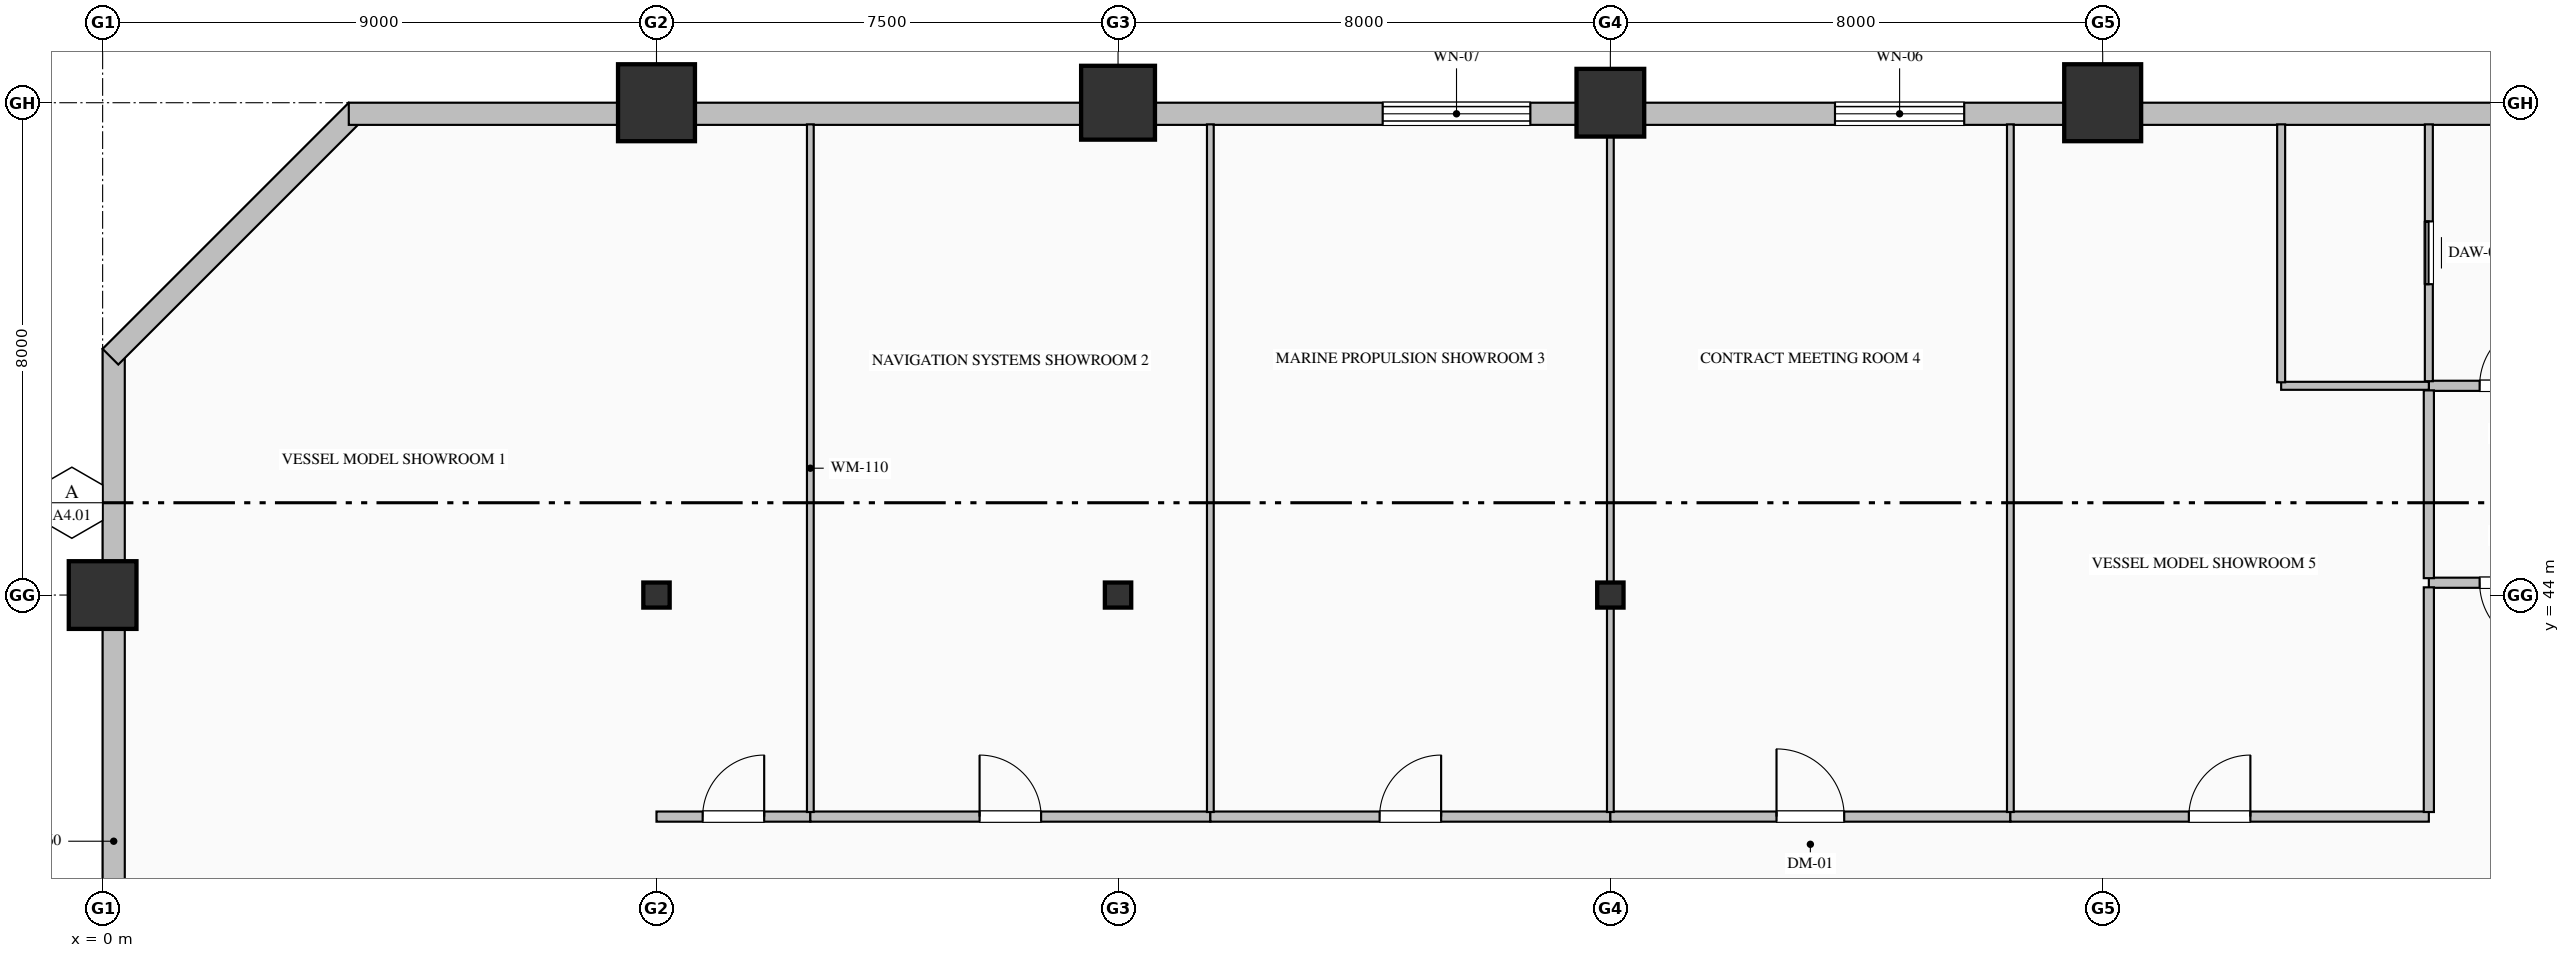
"""IFC4 building model, lengths in metres.
Left out: names, types, materials, properties, quantities, classifications, styles, units other than length and angle.
Written with IfcOpenShell. Run it as: python <this file> out.ifc"""

import sys

from ifc_helpers import new_model, si_unit, direction, frame, frame_2d, origin, origin_2d, place, context, subcontext, project, spatial, rectangle, hollow_rectangle, hollow_circle, i_section, extrude, element, fill, save


model = new_model("IFC4")
c1 = context("Model", 3, precision=1e-05, world=origin(), true_north=direction((0.0, 1.0)))
c2 = subcontext(c1, "Body", "Model", "MODEL_VIEW")
j1 = project(units=[si_unit("LENGTHUNIT", "METRE"), si_unit("PLANEANGLEUNIT", "RADIAN")], contexts=[c1])
p1 = place(None, origin())
s1 = spatial("IfcSite", under=j1, at=p1, CompositionType="ELEMENT")
p2 = place(p1, origin())
s2 = spatial("IfcBuilding", under=s1, at=p2, CompositionType="ELEMENT")
p3 = place(p2, frame((0.0, 0.0, 96.2)))
s3 = spatial("IfcBuildingStorey", under=s2, at=p3, CompositionType="ELEMENT", Elevation=96.2)
p4 = place(p3, frame((0.0, 44.0, 0.0), z_axis=(0.0, 0.0, 1.0), x_axis=(1.0, 0.0, 0.0)))
e1 = element("IfcColumn", 1, at=p4, inside=s3, PredefinedType="COLUMN", context=c2, shape_type="SweptSolid", body=[
    extrude(hollow_rectangle(XDim=1.1, YDim=1.1, WallThickness=0.04, at=origin_2d()), origin(), (0.0, 0.0, 1.0), 4.0),
])
p5 = place(p3, frame((9.0, 44.0, 0.0), z_axis=(0.0, 0.0, 1.0), x_axis=(1.0, 0.0, 0.0)))
e2 = element("IfcColumn", 2, at=p5, inside=s3, PredefinedType="COLUMN", context=c2, shape_type="SweptSolid", body=[
    extrude(i_section(OverallWidth=0.407, OverallDepth=0.428, WebThickness=0.02, FlangeThickness=0.035, FilletRadius=0.022, at=origin_2d()), origin(), (0.0, 0.0, 1.0), 4.0),
])
p6 = place(p3, frame((9.0, 52.0, 0.0), z_axis=(0.0, 0.0, 1.0), x_axis=(1.0, 0.0, 0.0)))
e3 = element("IfcColumn", 3, at=p6, inside=s3, PredefinedType="COLUMN", context=c2, shape_type="SweptSolid", body=[
    extrude(hollow_rectangle(XDim=1.25, YDim=1.25, WallThickness=0.045, at=origin_2d()), origin(), (0.0, 0.0, 1.0), 4.0),
])
p7 = place(p3, frame((16.5, 44.0, 0.0), z_axis=(0.0, 0.0, 1.0), x_axis=(1.0, 0.0, 0.0)))
e4 = element("IfcColumn", 4, at=p7, inside=s3, PredefinedType="COLUMN", context=c2, shape_type="SweptSolid", body=[
    extrude(i_section(OverallWidth=0.407, OverallDepth=0.428, WebThickness=0.02, FlangeThickness=0.035, FilletRadius=0.022, at=origin_2d()), origin(), (0.0, 0.0, 1.0), 4.0),
])
p8 = place(p3, frame((16.5, 52.0, 0.0), z_axis=(0.0, 0.0, 1.0), x_axis=(1.0, 0.0, 0.0)))
e5 = element("IfcColumn", 5, at=p8, inside=s3, PredefinedType="COLUMN", context=c2, shape_type="SweptSolid", body=[
    extrude(hollow_circle(Radius=0.6, WallThickness=0.04, at=origin_2d()), origin(), (0.0, 0.0, 1.0), 4.0),
])
p9 = place(p3, frame((24.5, 44.0, 0.0), z_axis=(0.0, 0.0, 1.0), x_axis=(1.0, 0.0, 0.0)))
e6 = element("IfcColumn", 6, at=p9, inside=s3, PredefinedType="COLUMN", context=c2, shape_type="SweptSolid", body=[
    extrude(i_section(OverallWidth=0.407, OverallDepth=0.428, WebThickness=0.02, FlangeThickness=0.035, FilletRadius=0.022, at=origin_2d()), origin(), (0.0, 0.0, 1.0), 4.0),
])
p10 = place(p3, frame((24.5, 52.0, 0.0), z_axis=(0.0, 0.0, 1.0), x_axis=(1.0, 0.0, 0.0)))
e7 = element("IfcColumn", 7, at=p10, inside=s3, PredefinedType="COLUMN", context=c2, shape_type="SweptSolid", body=[
    extrude(hollow_rectangle(XDim=1.1, YDim=1.1, WallThickness=0.04, at=origin_2d()), origin(), (0.0, 0.0, 1.0), 4.0),
])
p11 = place(p3, frame((32.5, 52.0, 0.0), z_axis=(0.0, 0.0, 1.0), x_axis=(1.0, 0.0, 0.0)))
e8 = element("IfcColumn", 8, at=p11, inside=s3, PredefinedType="COLUMN", context=c2, shape_type="SweptSolid", body=[
    extrude(hollow_rectangle(XDim=1.25, YDim=1.25, WallThickness=0.045, at=origin_2d()), origin(), (0.0, 0.0, 1.0), 4.0),
])
p12 = place(p3, frame((0.18, 32.0, 0.0), z_axis=(0.0, 0.0, 1.0), x_axis=(0.0, 1.0, 0.0)))
e9 = element("IfcWall", 9, at=p12, inside=s3, PredefinedType="SOLIDWALL", context=c2, shape_type="SweptSolid", body=[
    extrude(rectangle(XDim=16.0, YDim=0.36, at=frame_2d((8.0, 0.0))), origin(), (0.0, 0.0, 1.0), 3.25),
])
p13 = place(p3, frame((0.127, 47.873, 0.0), z_axis=(0.0, 0.0, 1.0), x_axis=(0.707106781187, 0.707106781187, 0.0)))
e10 = element("IfcWall", 10, at=p13, inside=s3, PredefinedType="SOLIDWALL", context=c2, shape_type="SweptSolid", body=[
    extrude(rectangle(XDim=5.657, YDim=0.36, at=frame_2d((2.828, 0.0))), origin(), (0.0, 0.0, 1.0), 3.75),
])
p14 = place(p3, frame((4.0, 51.82, 0.0), z_axis=(0.0, 0.0, 1.0), x_axis=(1.0, 0.0, 0.0)))
e11 = element("IfcWall", 11, at=p14, inside=s3, PredefinedType="SOLIDWALL", context=c2, shape_type="SweptSolid", body=[
    extrude(rectangle(XDim=36.52, YDim=0.36, at=frame_2d((18.26, 0.0))), origin(), (0.0, 0.0, 1.0), 3.25),
])
p15 = place(p14, frame((16.8, 0.0, 0.8)))
e12 = element("IfcOpeningElement", 12, at=p15, cuts=e11, PredefinedType="OPENING", context=c2, shape_type="SweptSolid", body=[
    extrude(rectangle(XDim=2.4, YDim=2.15, at=frame_2d((1.2, 1.075))), frame((0.0, 0.19, 0.0), z_axis=(0.0, -1.0, 0.0), x_axis=(1.0, 0.0, 0.0)), (0.0, 0.0, 1.0), 0.38),
])
p16 = place(p14, frame((24.15, 0.0, 0.85)))
e13 = element("IfcOpeningElement", 13, at=p16, cuts=e11, PredefinedType="OPENING", context=c2, shape_type="SweptSolid", body=[
    extrude(rectangle(XDim=2.1, YDim=2.05, at=frame_2d((1.05, 1.025))), frame((0.0, 0.19, 0.0), z_axis=(0.0, -1.0, 0.0), x_axis=(1.0, 0.0, 0.0)), (0.0, 0.0, 1.0), 0.38),
])
p17 = place(p3, frame((37.8, 47.4, 0.0), z_axis=(0.0, 0.0, 1.0), x_axis=(1.0, 0.0, 0.0)))
e14 = element("IfcWall", 14, at=p17, inside=s3, PredefinedType="PARTITIONING", context=c2, shape_type="SweptSolid", body=[
    extrude(rectangle(XDim=2.7, YDim=0.165, at=frame_2d((1.35, 0.0))), origin(), (0.0, 0.0, 1.0), 3.75),
])
p18 = place(p17, frame((0.825, 0.0, 0.0)))
e15 = element("IfcOpeningElement", 15, at=p18, cuts=e14, PredefinedType="OPENING", context=c2, shape_type="SweptSolid", body=[
    extrude(rectangle(XDim=1.05, YDim=2.15, at=frame_2d((0.525, 1.075))), frame((0.0, 0.093, 0.0), z_axis=(0.0, -1.0, 0.0), x_axis=(1.0, 0.0, 0.0)), (0.0, 0.0, 1.0), 0.185),
])
p19 = place(p3, frame((40.5, 44.2, 0.0), z_axis=(0.0, 0.0, 1.0), x_axis=(-1.0, 0.0, 0.0)))
e16 = element("IfcWall", 16, at=p19, inside=s3, PredefinedType="PARTITIONING", context=c2, shape_type="SweptSolid", body=[
    extrude(rectangle(XDim=2.7, YDim=0.165, at=frame_2d((1.35, 0.0))), origin(), (0.0, 0.0, 1.0), 3.75),
])
p20 = place(p19, frame((0.825, 0.0, 0.0)))
e17 = element("IfcOpeningElement", 17, at=p20, cuts=e16, PredefinedType="OPENING", context=c2, shape_type="SweptSolid", body=[
    extrude(rectangle(XDim=1.05, YDim=2.15, at=frame_2d((0.525, 1.075))), frame((0.0, 0.093, 0.0), z_axis=(0.0, -1.0, 0.0), x_axis=(1.0, 0.0, 0.0)), (0.0, 0.0, 1.0), 0.185),
])
p21 = place(p3, frame((37.8, 44.274, 0.0), z_axis=(0.0, 0.0, 1.0), x_axis=(0.0, 1.0, 0.0)))
e18 = element("IfcWall", 18, at=p21, inside=s3, PredefinedType="PARTITIONING", context=c2, shape_type="SweptSolid", body=[
    extrude(rectangle(XDim=3.051, YDim=0.165, at=frame_2d((1.525, 0.0))), origin(), (0.0, 0.0, 1.0), 3.75),
])
p22 = place(p3, frame((37.8, 47.475, 0.0), z_axis=(0.0, 0.0, 1.0), x_axis=(0.0, 1.0, 0.0)))
e19 = element("IfcWall", 19, at=p22, inside=s3, PredefinedType="PARTITIONING", context=c2, shape_type="SweptSolid", body=[
    extrude(rectangle(XDim=4.173, YDim=0.13, at=frame_2d((2.087, 0.0))), origin(), (0.0, 0.0, 1.0), 3.75),
])
p23 = place(p22, frame((1.577, 0.0, 0.0)))
e20 = element("IfcOpeningElement", 20, at=p23, cuts=e19, PredefinedType="OPENING", context=c2, shape_type="SweptSolid", body=[
    extrude(rectangle(XDim=1.02, YDim=2.15, at=frame_2d((0.51, 1.075))), frame((0.0, 0.075, 0.0), z_axis=(0.0, -1.0, 0.0), x_axis=(1.0, 0.0, 0.0)), (0.0, 0.0, 1.0), 0.15),
])
p24 = place(p3, frame((37.8, 47.4, 0.0), z_axis=(0.0, 0.0, 1.0), x_axis=(-1.0, 0.0, 0.0)))
e21 = element("IfcWall", 21, at=p24, inside=s3, PredefinedType="PARTITIONING", context=c2, shape_type="SweptSolid", body=[
    extrude(rectangle(XDim=2.4, YDim=0.13, at=frame_2d((1.2, 0.0))), origin(), (0.0, 0.0, 1.0), 3.75),
])
p25 = place(p3, frame((35.4, 47.457, 0.0), z_axis=(0.0, 0.0, 1.0), x_axis=(0.0, 1.0, 0.0)))
e22 = element("IfcWall", 22, at=p25, inside=s3, PredefinedType="PARTITIONING", context=c2, shape_type="SweptSolid", body=[
    extrude(rectangle(XDim=4.191, YDim=0.13, at=frame_2d((2.095, 0.0))), origin(), (0.0, 0.0, 1.0), 3.75),
])
p26 = place(p3, frame((9.0, 40.4, 0.0), z_axis=(0.0, 0.0, 1.0), x_axis=(1.0, 0.0, 0.0)))
e23 = element("IfcWall", 23, at=p26, inside=s3, PredefinedType="PARTITIONING", context=c2, shape_type="SweptSolid", body=[
    extrude(rectangle(XDim=2.5, YDim=0.165, at=frame_2d((1.25, 0.0))), origin(), (0.0, 0.0, 1.0), 3.75),
])
p27 = place(p26, frame((0.75, 0.0, 0.0)))
e24 = element("IfcOpeningElement", 24, at=p27, cuts=e23, PredefinedType="OPENING", context=c2, shape_type="SweptSolid", body=[
    extrude(rectangle(XDim=1.0, YDim=2.15, at=frame_2d((0.5, 1.075))), frame((0.0, 0.093, 0.0), z_axis=(0.0, -1.0, 0.0), x_axis=(1.0, 0.0, 0.0)), (0.0, 0.0, 1.0), 0.185),
])
p28 = place(p3, frame((11.5, 40.4, 0.0), z_axis=(0.0, 0.0, 1.0), x_axis=(1.0, 0.0, 0.0)))
e25 = element("IfcWall", 25, at=p28, inside=s3, PredefinedType="PARTITIONING", context=c2, shape_type="SweptSolid", body=[
    extrude(rectangle(XDim=6.5, YDim=0.165, at=frame_2d((3.25, 0.0))), origin(), (0.0, 0.0, 1.0), 3.75),
])
p29 = place(p28, frame((2.75, 0.0, 0.0)))
e26 = element("IfcOpeningElement", 26, at=p29, cuts=e25, PredefinedType="OPENING", context=c2, shape_type="SweptSolid", body=[
    extrude(rectangle(XDim=1.0, YDim=2.15, at=frame_2d((0.5, 1.075))), frame((0.0, 0.093, 0.0), z_axis=(0.0, -1.0, 0.0), x_axis=(1.0, 0.0, 0.0)), (0.0, 0.0, 1.0), 0.185),
])
p30 = place(p3, frame((18.0, 40.4, 0.0), z_axis=(0.0, 0.0, 1.0), x_axis=(1.0, 0.0, 0.0)))
e27 = element("IfcWall", 27, at=p30, inside=s3, PredefinedType="PARTITIONING", context=c2, shape_type="SweptSolid", body=[
    extrude(rectangle(XDim=6.5, YDim=0.165, at=frame_2d((3.25, 0.0))), origin(), (0.0, 0.0, 1.0), 3.75),
])
p31 = place(p30, frame((2.75, 0.0, 0.0)))
e28 = element("IfcOpeningElement", 28, at=p31, cuts=e27, PredefinedType="OPENING", context=c2, shape_type="SweptSolid", body=[
    extrude(rectangle(XDim=1.0, YDim=2.15, at=frame_2d((0.5, 1.075))), frame((0.0, 0.093, 0.0), z_axis=(0.0, -1.0, 0.0), x_axis=(1.0, 0.0, 0.0)), (0.0, 0.0, 1.0), 0.185),
])
p32 = place(p3, frame((24.5, 40.4, 0.0), z_axis=(0.0, 0.0, 1.0), x_axis=(1.0, 0.0, 0.0)))
e29 = element("IfcWall", 29, at=p32, inside=s3, PredefinedType="PARTITIONING", context=c2, shape_type="SweptSolid", body=[
    extrude(rectangle(XDim=6.5, YDim=0.165, at=frame_2d((3.25, 0.0))), origin(), (0.0, 0.0, 1.0), 3.75),
])
p33 = place(p32, frame((2.7, 0.0, 0.0)))
e30 = element("IfcOpeningElement", 30, at=p33, cuts=e29, PredefinedType="OPENING", context=c2, shape_type="SweptSolid", body=[
    extrude(rectangle(XDim=1.1, YDim=2.2, at=frame_2d((0.55, 1.1))), frame((0.0, 0.093, 0.0), z_axis=(0.0, -1.0, 0.0), x_axis=(1.0, 0.0, 0.0)), (0.0, 0.0, 1.0), 0.185),
])
p34 = place(p3, frame((31.0, 40.4, 0.0), z_axis=(0.0, 0.0, 1.0), x_axis=(1.0, 0.0, 0.0)))
e31 = element("IfcWall", 31, at=p34, inside=s3, PredefinedType="PARTITIONING", context=c2, shape_type="SweptSolid", body=[
    extrude(rectangle(XDim=6.8, YDim=0.165, at=frame_2d((3.4, 0.0))), origin(), (0.0, 0.0, 1.0), 3.75),
])
p35 = place(p34, frame((2.9, 0.0, 0.0)))
e32 = element("IfcOpeningElement", 32, at=p35, cuts=e31, PredefinedType="OPENING", context=c2, shape_type="SweptSolid", body=[
    extrude(rectangle(XDim=1.0, YDim=2.15, at=frame_2d((0.5, 1.075))), frame((0.0, 0.093, 0.0), z_axis=(0.0, -1.0, 0.0), x_axis=(1.0, 0.0, 0.0)), (0.0, 0.0, 1.0), 0.185),
])
p36 = place(p3, frame((37.8, 40.475, 0.0), z_axis=(0.0, 0.0, 1.0), x_axis=(0.0, 1.0, 0.0)))
e33 = element("IfcWall", 33, at=p36, inside=s3, PredefinedType="PARTITIONING", context=c2, shape_type="SweptSolid", body=[
    extrude(rectangle(XDim=3.651, YDim=0.165, at=frame_2d((1.825, 0.0))), origin(), (0.0, 0.0, 1.0), 3.75),
])
for number, where, z_axis, x_axis in (
    (34, (11.5, 51.648, 0.0), (0.0, 0.0, 1.0), (0.0, -1.0, 0.0)),
    (35, (18.0, 51.648, 0.0), (0.0, 0.0, 1.0), (0.0, -1.0, 0.0)),
):
    element("IfcWall", number, at=place(p3, frame(where, z_axis=z_axis, x_axis=x_axis)), inside=s3, PredefinedType="MOVABLE", context=c2, shape_type="SweptSolid", body=[
        extrude(rectangle(XDim=11.173, YDim=0.11, at=frame_2d((5.587, 0.0))), origin(), (0.0, 0.0, 1.0), 3.75),
    ])
p37 = place(p3, frame((24.5, 51.648, 0.0), z_axis=(0.0, 0.0, 1.0), x_axis=(0.0, -1.0, 0.0)))
e36 = element("IfcWall", 36, at=p37, inside=s3, PredefinedType="MOVABLE", context=c2, shape_type="SweptSolid", body=[
    extrude(rectangle(XDim=11.173, YDim=0.11, at=frame_2d((5.587, 0.0))), origin(), (0.0, 0.0, 1.0), 3.042),
])
p38 = place(p3, frame((31.0, 51.648, 0.0), z_axis=(0.0, 0.0, 1.0), x_axis=(0.0, -1.0, 0.0)))
e37 = element("IfcWall", 37, at=p38, inside=s3, PredefinedType="MOVABLE", context=c2, shape_type="SweptSolid", body=[
    extrude(rectangle(XDim=11.173, YDim=0.11, at=frame_2d((5.587, 0.0))), origin(), (0.0, 0.0, 1.0), 3.75),
])
p39 = place(p15, origin())
e38 = element("IfcWindow", 38, at=p39, inside=s3, PartitioningType="TRIPLE_PANEL_VERTICAL", PredefinedType="WINDOW", context=c2, shape_type="SweptSolid", body=[
    extrude(rectangle(XDim=2.4, YDim=2.15, at=frame_2d((1.2, 1.075))), frame((0.0, 0.15, 0.0), z_axis=(0.0, -1.0, 0.0), x_axis=(1.0, 0.0, 0.0)), (0.0, 0.0, 1.0), 0.06),
])
fill(e12, e38)
p40 = place(p16, origin())
e39 = element("IfcWindow", 39, at=p40, inside=s3, PartitioningType="TRIPLE_PANEL_VERTICAL", PredefinedType="WINDOW", context=c2, shape_type="SweptSolid", body=[
    extrude(rectangle(XDim=2.1, YDim=2.05, at=frame_2d((1.05, 1.025))), frame((0.0, 0.15, 0.0), z_axis=(0.0, -1.0, 0.0), x_axis=(1.0, 0.0, 0.0)), (0.0, 0.0, 1.0), 0.06),
])
fill(e13, e39)
p41 = place(p18, origin())
e40 = element("IfcDoor", 40, at=p41, inside=s3, OperationType="SINGLE_SWING_RIGHT", PredefinedType="DOOR", context=c2, shape_type="SweptSolid", body=[
    extrude(rectangle(XDim=1.05, YDim=2.15, at=frame_2d((0.525, 1.075))), frame((0.0, 0.025, 0.0), z_axis=(0.0, -1.0, 0.0), x_axis=(1.0, 0.0, 0.0)), (0.0, 0.0, 1.0), 0.05),
])
fill(e15, e40)
p42 = place(p20, origin())
e41 = element("IfcDoor", 41, at=p42, inside=s3, OperationType="SINGLE_SWING_LEFT", PredefinedType="DOOR", context=c2, shape_type="SweptSolid", body=[
    extrude(rectangle(XDim=1.05, YDim=2.15, at=frame_2d((0.525, 1.075))), frame((0.0, 0.025, 0.0), z_axis=(0.0, -1.0, 0.0), x_axis=(1.0, 0.0, 0.0)), (0.0, 0.0, 1.0), 0.05),
])
fill(e17, e41)
p43 = place(p23, origin())
e42 = element("IfcDoor", 42, at=p43, inside=s3, OperationType="SLIDING_TO_LEFT", PredefinedType="DOOR", context=c2, shape_type="SweptSolid", body=[
    extrude(rectangle(XDim=1.02, YDim=2.15, at=frame_2d((0.51, 1.075))), frame((0.0, 0.025, 0.0), z_axis=(0.0, -1.0, 0.0), x_axis=(1.0, 0.0, 0.0)), (0.0, 0.0, 1.0), 0.05),
])
fill(e20, e42)
p44 = place(p27, origin())
e43 = element("IfcDoor", 43, at=p44, inside=s3, OperationType="SINGLE_SWING_RIGHT", PredefinedType="DOOR", context=c2, shape_type="SweptSolid", body=[
    extrude(rectangle(XDim=1.0, YDim=2.15, at=frame_2d((0.5, 1.075))), frame((0.0, 0.025, 0.0), z_axis=(0.0, -1.0, 0.0), x_axis=(1.0, 0.0, 0.0)), (0.0, 0.0, 1.0), 0.05),
])
fill(e24, e43)
p45 = place(p29, origin())
e44 = element("IfcDoor", 44, at=p45, inside=s3, OperationType="SINGLE_SWING_LEFT", PredefinedType="DOOR", context=c2, shape_type="SweptSolid", body=[
    extrude(rectangle(XDim=1.0, YDim=2.15, at=frame_2d((0.5, 1.075))), frame((0.0, 0.025, 0.0), z_axis=(0.0, -1.0, 0.0), x_axis=(1.0, 0.0, 0.0)), (0.0, 0.0, 1.0), 0.05),
])
fill(e26, e44)
p46 = place(p31, origin())
e45 = element("IfcDoor", 45, at=p46, inside=s3, OperationType="SINGLE_SWING_RIGHT", PredefinedType="DOOR", context=c2, shape_type="SweptSolid", body=[
    extrude(rectangle(XDim=1.0, YDim=2.15, at=frame_2d((0.5, 1.075))), frame((0.0, 0.025, 0.0), z_axis=(0.0, -1.0, 0.0), x_axis=(1.0, 0.0, 0.0)), (0.0, 0.0, 1.0), 0.05),
])
fill(e28, e45)
p47 = place(p33, origin())
e46 = element("IfcDoor", 46, at=p47, inside=s3, OperationType="SINGLE_SWING_LEFT", PredefinedType="DOOR", context=c2, shape_type="SweptSolid", body=[
    extrude(rectangle(XDim=1.1, YDim=2.2, at=frame_2d((0.55, 1.1))), frame((0.0, 0.025, 0.0), z_axis=(0.0, -1.0, 0.0), x_axis=(1.0, 0.0, 0.0)), (0.0, 0.0, 1.0), 0.05),
])
fill(e30, e46)
p48 = place(p35, origin())
e47 = element("IfcDoor", 47, at=p48, inside=s3, OperationType="SINGLE_SWING_RIGHT", PredefinedType="DOOR", context=c2, shape_type="SweptSolid", body=[
    extrude(rectangle(XDim=1.0, YDim=2.15, at=frame_2d((0.5, 1.075))), frame((0.0, 0.025, 0.0), z_axis=(0.0, -1.0, 0.0), x_axis=(1.0, 0.0, 0.0)), (0.0, 0.0, 1.0), 0.05),
])
fill(e32, e47)
save(model, sys.argv[1])
